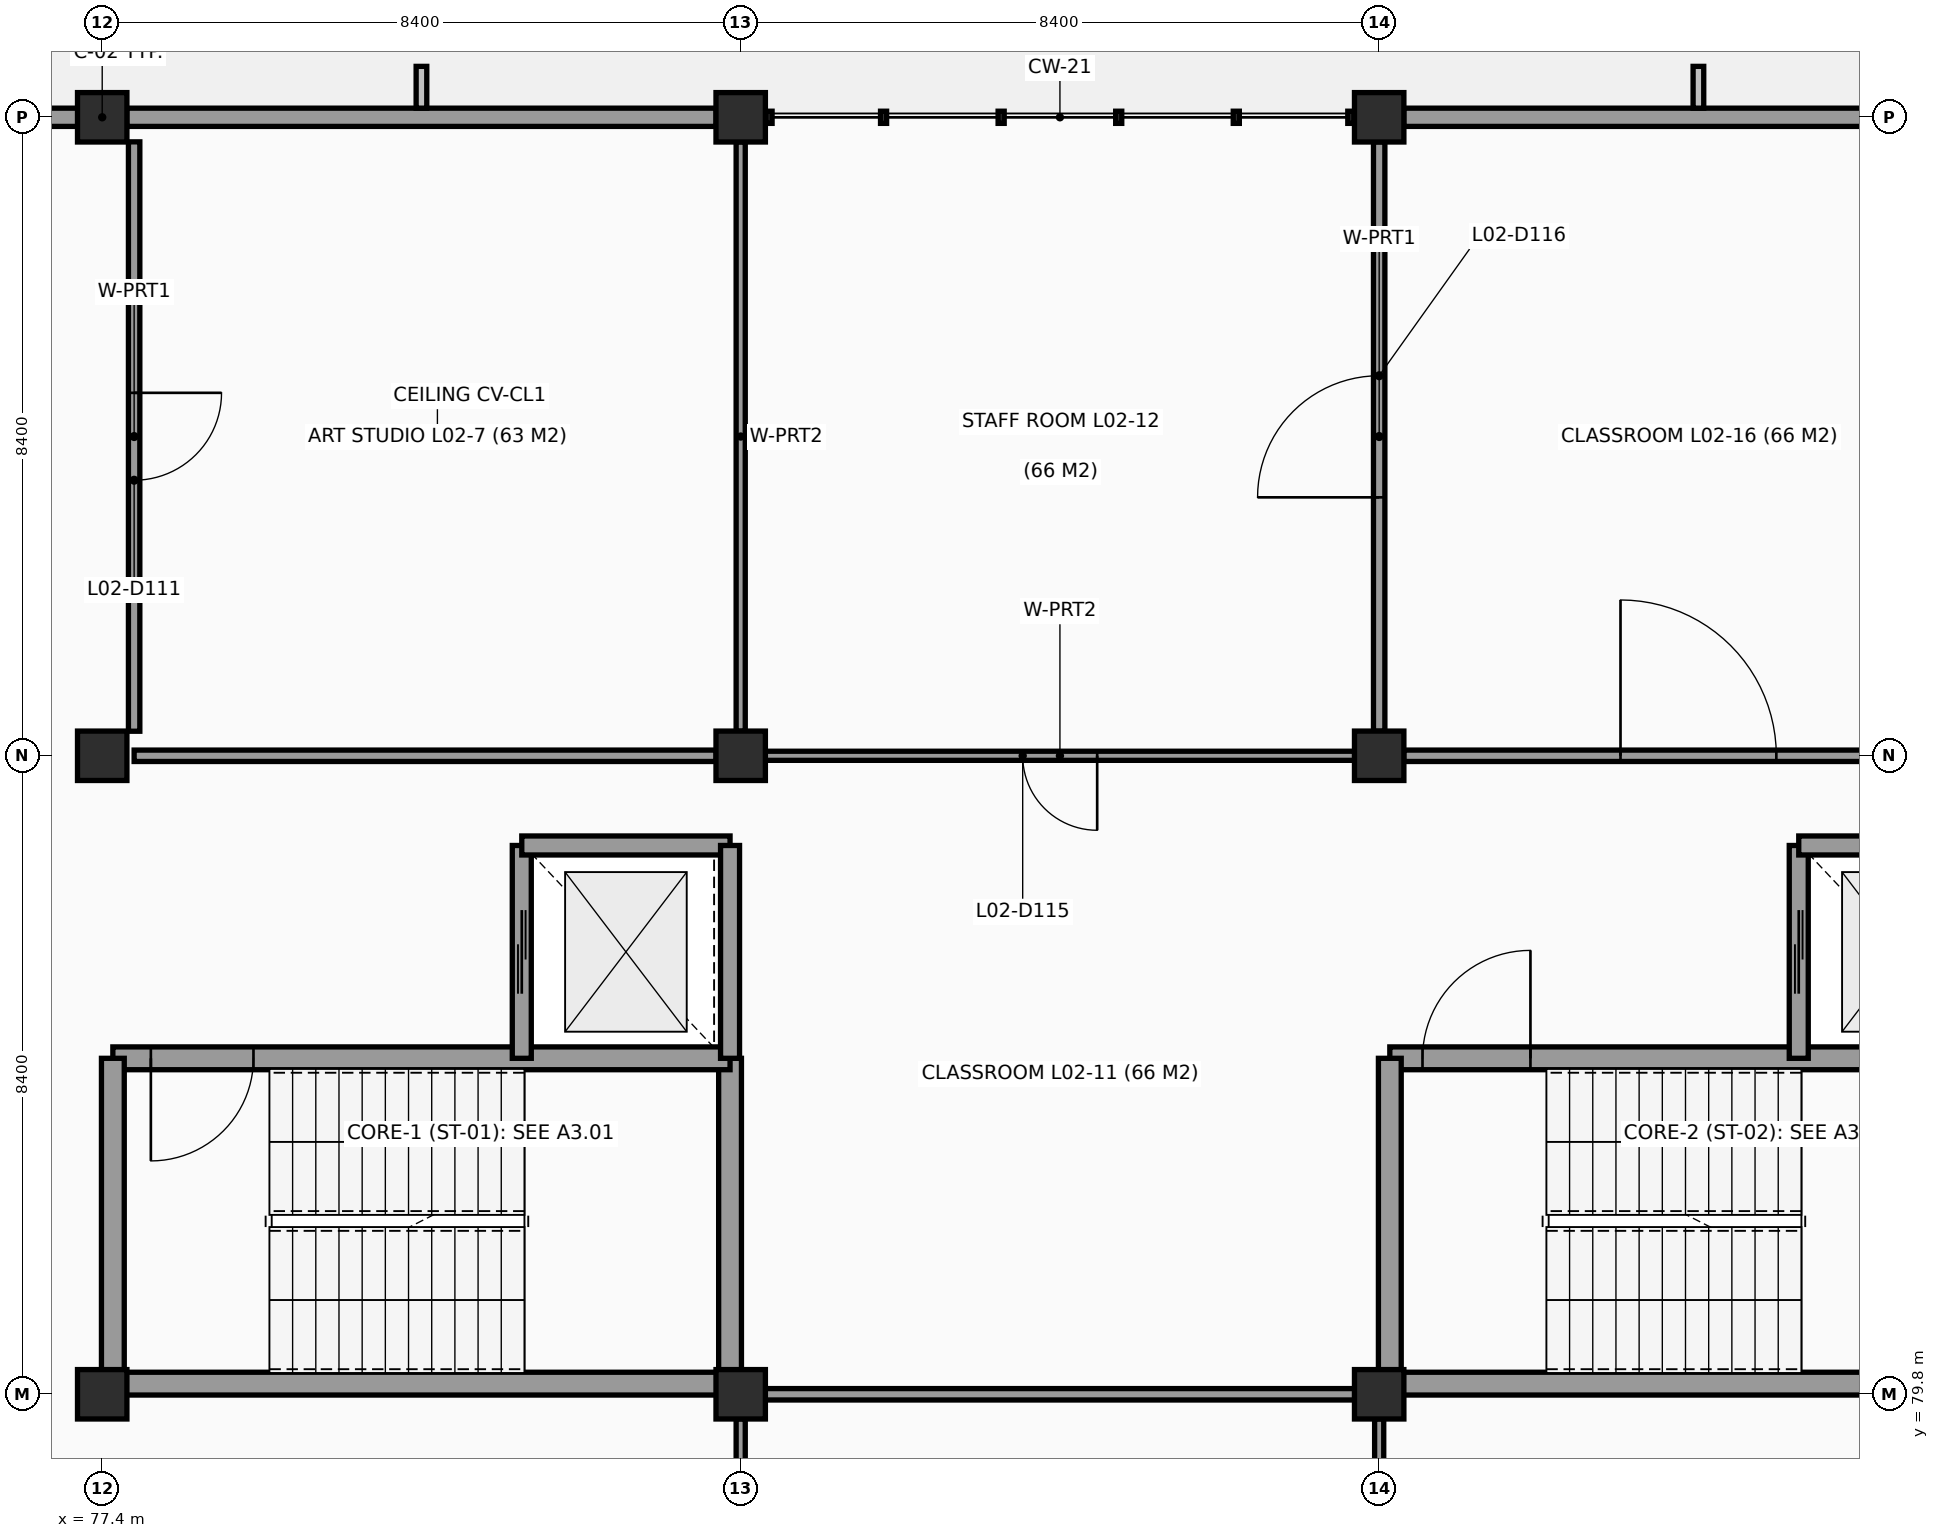
"""IFC4 building model, lengths in metres.
Left out: names, types, materials, properties, quantities, classifications, styles, units other than length and angle.
Written with IfcOpenShell. Run it as: python <this file> out.ifc"""

import sys

from ifc_helpers import new_model, si_unit, direction, frame, frame_2d, origin, origin_2d, place, context, subcontext, project, spatial, rectangle, extrude, element, fill, save


model = new_model("IFC4")
c1 = context("Model", 3, precision=1e-05, world=origin(), true_north=direction((0.0, 1.0)))
c2 = subcontext(c1, "Body", "Model", "MODEL_VIEW")
j1 = project(units=[si_unit("LENGTHUNIT", "METRE"), si_unit("PLANEANGLEUNIT", "RADIAN")], contexts=[c1])
p1 = place(None, origin())
s1 = spatial("IfcSite", under=j1, at=p1, CompositionType="ELEMENT")
p2 = place(p1, origin())
s2 = spatial("IfcBuilding", under=s1, at=p2, CompositionType="ELEMENT")
p3 = place(p2, frame((0.0, 0.0, 7.8)))
s3 = spatial("IfcBuildingStorey", under=s2, at=p3, CompositionType="ELEMENT", Elevation=7.8)
for number, where, z_axis, x_axis in (
    (1, (77.4, 79.8, 0.0), (0.0, 0.0, 1.0), (1.0, 0.0, 0.0)),
    (2, (77.4, 88.2, 0.0), (0.0, 0.0, 1.0), (1.0, 0.0, 0.0)),
    (3, (77.4, 96.6, 0.0), (0.0, 0.0, 1.0), (1.0, 0.0, 0.0)),
    (4, (85.8, 79.8, 0.0), (0.0, 0.0, 1.0), (1.0, 0.0, 0.0)),
    (5, (85.8, 88.2, 0.0), (0.0, 0.0, 1.0), (1.0, 0.0, 0.0)),
    (6, (85.8, 96.6, 0.0), (0.0, 0.0, 1.0), (1.0, 0.0, 0.0)),
    (7, (94.2, 79.8, 0.0), (0.0, 0.0, 1.0), (1.0, 0.0, 0.0)),
    (8, (94.2, 88.2, 0.0), (0.0, 0.0, 1.0), (1.0, 0.0, 0.0)),
    (9, (94.2, 96.6, 0.0), (0.0, 0.0, 1.0), (1.0, 0.0, 0.0)),
):
    element("IfcColumn", number, at=place(p3, frame(where, z_axis=z_axis, x_axis=x_axis)), inside=s3, PredefinedType="COLUMN", context=c2, shape_type="SweptSolid", body=[
        extrude(rectangle(XDim=0.65, YDim=0.65, at=origin_2d()), origin(), (0.0, 0.0, 1.0), 3.6),
    ])
p4 = place(p3, frame((74.673, 96.6, 0.0), z_axis=(0.0, 0.0, 1.0), x_axis=(1.0, 0.0, 0.0)))
e10 = element("IfcWall", 10, at=p4, inside=s3, PredefinedType="SOLIDWALL", context=c2, shape_type="SweptSolid", body=[
    extrude(rectangle(XDim=2.404, YDim=0.24, at=frame_2d((1.202, 0.0))), origin(), (0.0, 0.0, 1.0), 2.64),
])
for number, where, z_axis, x_axis in (
    (11, (77.723, 96.6, 0.0), (0.0, 0.0, 1.0), (1.0, 0.0, 0.0)),
    (12, (94.523, 96.6, 0.0), (0.0, 0.0, 1.0), (1.0, 0.0, 0.0)),
):
    element("IfcWall", number, at=place(p3, frame(where, z_axis=z_axis, x_axis=x_axis)), inside=s3, PredefinedType="SOLIDWALL", context=c2, shape_type="SweptSolid", body=[
        extrude(rectangle(XDim=7.754, YDim=0.24, at=frame_2d((3.877, 0.0))), origin(), (0.0, 0.0, 1.0), 2.64),
    ])
p5 = place(p3, frame((77.54, 79.94, 0.0), z_axis=(0.0, 0.0, 1.0), x_axis=(1.0, 0.0, 0.0)))
e13 = element("IfcWall", 13, at=p5, inside=s3, PredefinedType="SHEAR", context=c2, shape_type="SweptSolid", body=[
    extrude(rectangle(XDim=8.12, YDim=0.3, at=frame_2d((4.06, 0.0))), origin(), (0.0, 0.0, 1.0), 3.6),
])
p6 = place(p3, frame((85.66, 79.94, 0.0), z_axis=(0.0, 0.0, 1.0), x_axis=(0.0, 1.0, 0.0)))
e14 = element("IfcWall", 14, at=p6, inside=s3, PredefinedType="SHEAR", context=c2, shape_type="SweptSolid", body=[
    extrude(rectangle(XDim=4.28, YDim=0.3, at=frame_2d((2.14, 0.0))), origin(), (0.0, 0.0, 1.0), 3.6),
])
p7 = place(p3, frame((85.66, 84.22, 0.0), z_axis=(0.0, 0.0, 1.0), x_axis=(-1.0, 0.0, 0.0)))
e15 = element("IfcWall", 15, at=p7, inside=s3, PredefinedType="SHEAR", context=c2, shape_type="SweptSolid", body=[
    extrude(rectangle(XDim=8.12, YDim=0.3, at=frame_2d((4.06, 0.0))), origin(), (0.0, 0.0, 1.0), 3.6),
])
p8 = place(p7, frame((6.27, 0.0, 0.0)))
e16 = element("IfcOpeningElement", 16, at=p8, cuts=e15, PredefinedType="OPENING", context=c2, shape_type="SweptSolid", body=[
    extrude(rectangle(XDim=1.35, YDim=2.15, at=frame_2d((0.675, 1.075))), frame((0.0, 0.16, 0.0), z_axis=(0.0, -1.0, 0.0), x_axis=(1.0, 0.0, 0.0)), (0.0, 0.0, 1.0), 0.32),
])
p9 = place(p3, frame((77.54, 84.22, 0.0), z_axis=(0.0, 0.0, 1.0), x_axis=(0.0, -1.0, 0.0)))
e17 = element("IfcWall", 17, at=p9, inside=s3, PredefinedType="SHEAR", context=c2, shape_type="SweptSolid", body=[
    extrude(rectangle(XDim=4.28, YDim=0.3, at=frame_2d((2.14, 0.0))), origin(), (0.0, 0.0, 1.0), 3.6),
])
p10 = place(p3, frame((82.92, 87.02, 0.0), z_axis=(0.0, 0.0, 1.0), x_axis=(0.0, -1.0, 0.0)))
e18 = element("IfcWall", 18, at=p10, inside=s3, PredefinedType="SHEAR", context=c2, shape_type="SweptSolid", body=[
    extrude(rectangle(XDim=2.8, YDim=0.25, at=frame_2d((1.4, 0.0))), origin(), (0.0, 0.0, 1.0), 3.6),
])
p11 = place(p10, frame((0.85, 0.0, 0.0)))
e19 = element("IfcOpeningElement", 19, at=p11, cuts=e18, PredefinedType="OPENING", context=c2, shape_type="SweptSolid", body=[
    extrude(rectangle(XDim=1.1, YDim=2.15, at=frame_2d((0.55, 1.075))), frame((0.0, 0.135, 0.0), z_axis=(0.0, -1.0, 0.0), x_axis=(1.0, 0.0, 0.0)), (0.0, 0.0, 1.0), 0.27),
])
p12 = place(p3, frame((85.66, 87.02, 0.0), z_axis=(0.0, 0.0, 1.0), x_axis=(-1.0, 0.0, 0.0)))
e20 = element("IfcWall", 20, at=p12, inside=s3, PredefinedType="SHEAR", context=c2, shape_type="SweptSolid", body=[
    extrude(rectangle(XDim=2.74, YDim=0.25, at=frame_2d((1.37, 0.0))), origin(), (0.0, 0.0, 1.0), 3.6),
])
p13 = place(p3, frame((85.66, 84.22, 0.0), z_axis=(0.0, 0.0, 1.0), x_axis=(0.0, 1.0, 0.0)))
e21 = element("IfcWall", 21, at=p13, inside=s3, PredefinedType="SHEAR", context=c2, shape_type="SweptSolid", body=[
    extrude(rectangle(XDim=2.8, YDim=0.25, at=frame_2d((1.4, 0.0))), origin(), (0.0, 0.0, 1.0), 3.6),
])
p14 = place(p3, frame((94.34, 79.94, 0.0), z_axis=(0.0, 0.0, 1.0), x_axis=(1.0, 0.0, 0.0)))
e22 = element("IfcWall", 22, at=p14, inside=s3, PredefinedType="SHEAR", context=c2, shape_type="SweptSolid", body=[
    extrude(rectangle(XDim=8.12, YDim=0.3, at=frame_2d((4.06, 0.0))), origin(), (0.0, 0.0, 1.0), 3.6),
])
p15 = place(p3, frame((102.46, 84.22, 0.0), z_axis=(0.0, 0.0, 1.0), x_axis=(-1.0, 0.0, 0.0)))
e23 = element("IfcWall", 23, at=p15, inside=s3, PredefinedType="SHEAR", context=c2, shape_type="SweptSolid", body=[
    extrude(rectangle(XDim=8.12, YDim=0.3, at=frame_2d((4.06, 0.0))), origin(), (0.0, 0.0, 1.0), 3.6),
])
p16 = place(p15, frame((6.27, 0.0, 0.0)))
e24 = element("IfcOpeningElement", 24, at=p16, cuts=e23, PredefinedType="OPENING", context=c2, shape_type="SweptSolid", body=[
    extrude(rectangle(XDim=1.42, YDim=2.15, at=frame_2d((0.71, 1.075))), frame((0.0, 0.16, 0.0), z_axis=(0.0, -1.0, 0.0), x_axis=(1.0, 0.0, 0.0)), (0.0, 0.0, 1.0), 0.32),
])
p17 = place(p3, frame((94.34, 84.22, 0.0), z_axis=(0.0, 0.0, 1.0), x_axis=(0.0, -1.0, 0.0)))
e25 = element("IfcWall", 25, at=p17, inside=s3, PredefinedType="SHEAR", context=c2, shape_type="SweptSolid", body=[
    extrude(rectangle(XDim=4.28, YDim=0.3, at=frame_2d((2.14, 0.0))), origin(), (0.0, 0.0, 1.0), 3.6),
])
p18 = place(p3, frame((99.72, 87.02, 0.0), z_axis=(0.0, 0.0, 1.0), x_axis=(0.0, -1.0, 0.0)))
e26 = element("IfcWall", 26, at=p18, inside=s3, PredefinedType="SHEAR", context=c2, shape_type="SweptSolid", body=[
    extrude(rectangle(XDim=2.8, YDim=0.25, at=frame_2d((1.4, 0.0))), origin(), (0.0, 0.0, 1.0), 3.6),
])
p19 = place(p18, frame((0.85, 0.0, 0.0)))
e27 = element("IfcOpeningElement", 27, at=p19, cuts=e26, PredefinedType="OPENING", context=c2, shape_type="SweptSolid", body=[
    extrude(rectangle(XDim=1.1, YDim=2.15, at=frame_2d((0.55, 1.075))), frame((0.0, 0.135, 0.0), z_axis=(0.0, -1.0, 0.0), x_axis=(1.0, 0.0, 0.0)), (0.0, 0.0, 1.0), 0.27),
])
p20 = place(p3, frame((102.46, 87.02, 0.0), z_axis=(0.0, 0.0, 1.0), x_axis=(-1.0, 0.0, 0.0)))
e28 = element("IfcWall", 28, at=p20, inside=s3, PredefinedType="SHEAR", context=c2, shape_type="SweptSolid", body=[
    extrude(rectangle(XDim=2.74, YDim=0.25, at=frame_2d((1.37, 0.0))), origin(), (0.0, 0.0, 1.0), 3.6),
])
p21 = place(p3, frame((77.82, 88.523, 0.0), z_axis=(0.0, 0.0, 1.0), x_axis=(0.0, 1.0, 0.0)))
e29 = element("IfcWall", 29, at=p21, inside=s3, PredefinedType="PARTITIONING", context=c2, shape_type="SweptSolid", body=[
    extrude(rectangle(XDim=7.754, YDim=0.15, at=frame_2d((3.877, 0.0))), origin(), (0.0, 0.0, 1.0), 2.89),
])
p22 = place(p21, frame((3.302, 0.0, 0.0)))
e30 = element("IfcOpeningElement", 30, at=p22, cuts=e29, PredefinedType="OPENING", context=c2, shape_type="SweptSolid", body=[
    extrude(rectangle(XDim=1.15, YDim=2.15, at=frame_2d((0.575, 1.075))), frame((0.0, 0.085, 0.0), z_axis=(0.0, -1.0, 0.0), x_axis=(1.0, 0.0, 0.0)), (0.0, 0.0, 1.0), 0.17),
])
p23 = place(p3, frame((85.8, 96.277, 0.0), z_axis=(0.0, 0.0, 1.0), x_axis=(0.0, -1.0, 0.0)))
e31 = element("IfcWall", 31, at=p23, inside=s3, PredefinedType="PARTITIONING", context=c2, shape_type="SweptSolid", body=[
    extrude(rectangle(XDim=7.754, YDim=0.12, at=frame_2d((3.877, 0.0))), origin(), (0.0, 0.0, 1.0), 2.98),
])
p24 = place(p3, frame((85.477, 88.2, 0.0), z_axis=(0.0, 0.0, 1.0), x_axis=(-1.0, 0.0, 0.0)))
e32 = element("IfcWall", 32, at=p24, inside=s3, PredefinedType="PARTITIONING", context=c2, shape_type="SweptSolid", body=[
    extrude(rectangle(XDim=7.657, YDim=0.15, at=frame_2d((3.829, 0.0))), origin(), (0.0, 0.0, 1.0), 2.59),
])
p25 = place(p3, frame((85.8, 73.82, 0.0), z_axis=(0.0, 0.0, 1.0), x_axis=(0.0, 1.0, 0.0)))
e33 = element("IfcWall", 33, at=p25, inside=s3, PredefinedType="PARTITIONING", context=c2, shape_type="SweptSolid", body=[
    extrude(rectangle(XDim=5.657, YDim=0.12, at=frame_2d((2.829, 0.0))), origin(), (0.0, 0.0, 1.0), 2.98),
])
p26 = place(p25, frame((2.329, 0.0, 0.0)))
e34 = element("IfcOpeningElement", 34, at=p26, cuts=e33, PredefinedType="OPENING", context=c2, shape_type="SweptSolid", body=[
    extrude(rectangle(XDim=1.0, YDim=2.1, at=frame_2d((0.5, 1.05))), frame((0.0, 0.07, 0.0), z_axis=(0.0, -1.0, 0.0), x_axis=(1.0, 0.0, 0.0)), (0.0, 0.0, 1.0), 0.14),
])
p27 = place(p3, frame((86.123, 79.8, 0.0), z_axis=(0.0, 0.0, 1.0), x_axis=(1.0, 0.0, 0.0)))
e35 = element("IfcWall", 35, at=p27, inside=s3, PredefinedType="PARTITIONING", context=c2, shape_type="SweptSolid", body=[
    extrude(rectangle(XDim=7.754, YDim=0.15, at=frame_2d((3.877, 0.0))), origin(), (0.0, 0.0, 1.0), 2.95),
])
p28 = place(p3, frame((94.2, 79.477, 0.0), z_axis=(0.0, 0.0, 1.0), x_axis=(0.0, -1.0, 0.0)))
e36 = element("IfcWall", 36, at=p28, inside=s3, PredefinedType="PARTITIONING", context=c2, shape_type="SweptSolid", body=[
    extrude(rectangle(XDim=5.657, YDim=0.12, at=frame_2d((2.829, 0.0))), origin(), (0.0, 0.0, 1.0), 2.69),
])
p29 = place(p3, frame((86.123, 88.2, 0.0), z_axis=(0.0, 0.0, 1.0), x_axis=(1.0, 0.0, 0.0)))
e37 = element("IfcWall", 37, at=p29, inside=s3, PredefinedType="PARTITIONING", context=c2, shape_type="SweptSolid", body=[
    extrude(rectangle(XDim=7.754, YDim=0.12, at=frame_2d((3.877, 0.0))), origin(), (0.0, 0.0, 1.0), 2.59),
])
p30 = place(p29, frame((3.387, 0.0, 0.0)))
e38 = element("IfcOpeningElement", 38, at=p30, cuts=e37, PredefinedType="OPENING", context=c2, shape_type="SweptSolid", body=[
    extrude(rectangle(XDim=0.98, YDim=2.12, at=frame_2d((0.49, 1.06))), frame((0.0, 0.07, 0.0), z_axis=(0.0, -1.0, 0.0), x_axis=(1.0, 0.0, 0.0)), (0.0, 0.0, 1.0), 0.14),
])
p31 = place(p3, frame((94.2, 96.277, 0.0), z_axis=(0.0, 0.0, 1.0), x_axis=(0.0, -1.0, 0.0)))
e39 = element("IfcWall", 39, at=p31, inside=s3, PredefinedType="PARTITIONING", context=c2, shape_type="SweptSolid", body=[
    extrude(rectangle(XDim=7.754, YDim=0.15, at=frame_2d((3.877, 0.0))), origin(), (0.0, 0.0, 1.0), 2.69),
])
p32 = place(p31, frame((3.077, 0.0, 0.0)))
e40 = element("IfcOpeningElement", 40, at=p32, cuts=e39, PredefinedType="OPENING", context=c2, shape_type="SweptSolid", body=[
    extrude(rectangle(XDim=1.6, YDim=2.2, at=frame_2d((0.8, 1.1))), frame((0.0, 0.085, 0.0), z_axis=(0.0, -1.0, 0.0), x_axis=(1.0, 0.0, 0.0)), (0.0, 0.0, 1.0), 0.17),
])
p33 = place(p3, frame((102.277, 88.2, 0.0), z_axis=(0.0, 0.0, 1.0), x_axis=(-1.0, 0.0, 0.0)))
e41 = element("IfcWall", 41, at=p33, inside=s3, PredefinedType="PARTITIONING", context=c2, shape_type="SweptSolid", body=[
    extrude(rectangle(XDim=7.754, YDim=0.15, at=frame_2d((3.877, 0.0))), origin(), (0.0, 0.0, 1.0), 2.59),
])
p34 = place(p33, frame((2.852, 0.0, 0.0)))
e42 = element("IfcOpeningElement", 42, at=p34, cuts=e41, PredefinedType="OPENING", context=c2, shape_type="SweptSolid", body=[
    extrude(rectangle(XDim=2.05, YDim=2.35, at=frame_2d((1.025, 1.175))), frame((0.0, 0.085, 0.0), z_axis=(0.0, -1.0, 0.0), x_axis=(1.0, 0.0, 0.0)), (0.0, 0.0, 1.0), 0.17),
])
p35 = place(p8, frame((1.35, 0.0, 0.0), z_axis=(0.0, 0.0, 1.0), x_axis=(-1.0, 0.0, 0.0)))
e43 = element("IfcDoor", 43, at=p35, inside=s3, OperationType="SINGLE_SWING_RIGHT", PredefinedType="DOOR", context=c2, shape_type="SweptSolid", body=[
    extrude(rectangle(XDim=1.35, YDim=2.15, at=frame_2d((0.675, 1.075))), frame((0.0, 0.025, 0.0), z_axis=(0.0, -1.0, 0.0), x_axis=(1.0, 0.0, 0.0)), (0.0, 0.0, 1.0), 0.05),
])
fill(e16, e43)
p36 = place(p11, origin())
e44 = element("IfcDoor", 44, at=p36, inside=s3, OperationType="DOUBLE_DOOR_SLIDING", PredefinedType="DOOR", context=c2, shape_type="SweptSolid", body=[
    extrude(rectangle(XDim=1.1, YDim=2.15, at=frame_2d((0.55, 1.075))), frame((0.0, 0.025, 0.0), z_axis=(0.0, -1.0, 0.0), x_axis=(1.0, 0.0, 0.0)), (0.0, 0.0, 1.0), 0.05),
])
fill(e19, e44)
p37 = place(p16, frame((1.42, 0.0, 0.0), z_axis=(0.0, 0.0, 1.0), x_axis=(-1.0, 0.0, 0.0)))
e45 = element("IfcDoor", 45, at=p37, inside=s3, OperationType="SINGLE_SWING_LEFT", PredefinedType="DOOR", context=c2, shape_type="SweptSolid", body=[
    extrude(rectangle(XDim=1.42, YDim=2.15, at=frame_2d((0.71, 1.075))), frame((0.0, 0.025, 0.0), z_axis=(0.0, -1.0, 0.0), x_axis=(1.0, 0.0, 0.0)), (0.0, 0.0, 1.0), 0.05),
])
fill(e24, e45)
p38 = place(p19, origin())
e46 = element("IfcDoor", 46, at=p38, inside=s3, OperationType="DOUBLE_DOOR_SLIDING", PredefinedType="DOOR", context=c2, shape_type="SweptSolid", body=[
    extrude(rectangle(XDim=1.1, YDim=2.15, at=frame_2d((0.55, 1.075))), frame((0.0, 0.025, 0.0), z_axis=(0.0, -1.0, 0.0), x_axis=(1.0, 0.0, 0.0)), (0.0, 0.0, 1.0), 0.05),
])
fill(e27, e46)
p39 = place(p22, origin())
e47 = element("IfcDoor", 47, at=p39, inside=s3, OperationType="SINGLE_SWING_RIGHT", PredefinedType="DOOR", context=c2, shape_type="SweptSolid", body=[
    extrude(rectangle(XDim=1.15, YDim=2.15, at=frame_2d((0.575, 1.075))), frame((0.0, 0.025, 0.0), z_axis=(0.0, -1.0, 0.0), x_axis=(1.0, 0.0, 0.0)), (0.0, 0.0, 1.0), 0.05),
])
fill(e30, e47)
p40 = place(p30, origin())
e48 = element("IfcDoor", 48, at=p40, inside=s3, OperationType="SINGLE_SWING_RIGHT", PredefinedType="DOOR", context=c2, shape_type="SweptSolid", body=[
    extrude(rectangle(XDim=0.98, YDim=2.12, at=frame_2d((0.49, 1.06))), frame((0.0, 0.025, 0.0), z_axis=(0.0, -1.0, 0.0), x_axis=(1.0, 0.0, 0.0)), (0.0, 0.0, 1.0), 0.05),
])
fill(e38, e48)
p41 = place(p32, origin())
e49 = element("IfcDoor", 49, at=p41, inside=s3, OperationType="DOUBLE_DOOR_SINGLE_SWING", PredefinedType="DOOR", context=c2, shape_type="SweptSolid", body=[
    extrude(rectangle(XDim=1.6, YDim=2.2, at=frame_2d((0.8, 1.1))), frame((0.0, 0.025, 0.0), z_axis=(0.0, -1.0, 0.0), x_axis=(1.0, 0.0, 0.0)), (0.0, 0.0, 1.0), 0.05),
])
fill(e40, e49)
p42 = place(p34, origin())
e50 = element("IfcDoor", 50, at=p42, inside=s3, OperationType="DOUBLE_DOOR_SINGLE_SWING", PredefinedType="DOOR", context=c2, shape_type="SweptSolid", body=[
    extrude(rectangle(XDim=2.05, YDim=2.35, at=frame_2d((1.025, 1.175))), frame((0.0, 0.025, 0.0), z_axis=(0.0, -1.0, 0.0), x_axis=(1.0, 0.0, 0.0)), (0.0, 0.0, 1.0), 0.05),
])
fill(e42, e50)
save(model, sys.argv[1])
